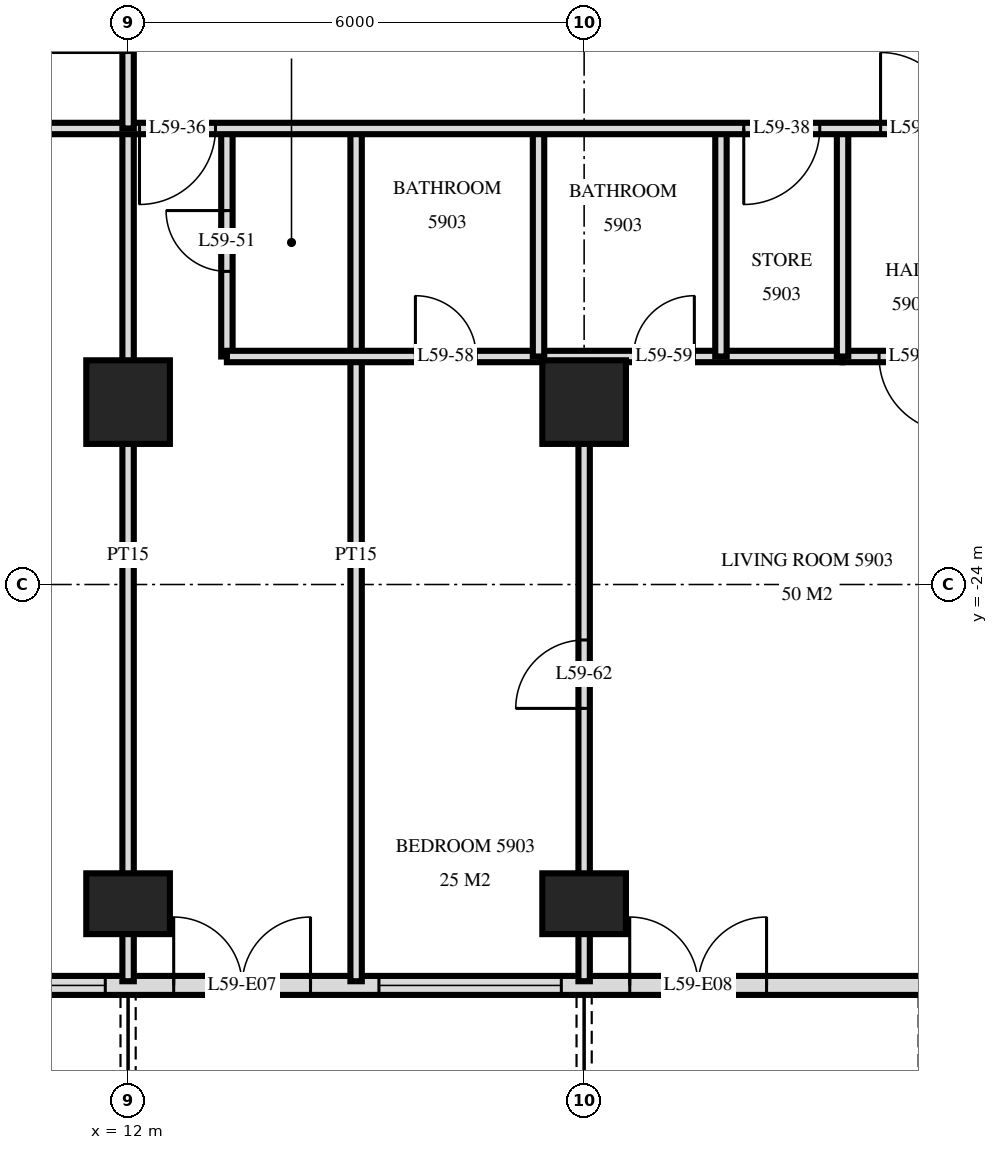
"""IFC4 building model, lengths in metres.
Left out: names, types, materials, properties, quantities, classifications, styles, units other than length and angle.
Written with IfcOpenShell. Run it as: python <this file> out.ifc"""

import sys

from ifc_helpers import new_model, si_unit, direction, frame, frame_2d, origin, origin_2d, place, context, subcontext, project, spatial, rectangle, extrude, element, fill, save


model = new_model("IFC4")
c1 = context("Model", 3, precision=1e-05, world=origin(), true_north=direction((0.0, 1.0)))
c2 = subcontext(c1, "Body", "Model", "MODEL_VIEW")
j1 = project(units=[si_unit("LENGTHUNIT", "METRE"), si_unit("PLANEANGLEUNIT", "RADIAN")], contexts=[c1])
p1 = place(None, origin())
s1 = spatial("IfcSite", under=j1, at=p1, CompositionType="ELEMENT")
p2 = place(p1, origin())
s2 = spatial("IfcBuilding", under=s1, at=p2, CompositionType="ELEMENT")
p3 = place(p2, frame((0.0, 0.0, 225.6)))
s3 = spatial("IfcBuildingStorey", under=s2, at=p3, CompositionType="ELEMENT", Elevation=225.6)
p4 = place(p3, frame((12.0, -28.2, 0.0), z_axis=(0.0, 0.0, 1.0), x_axis=(1.0, 0.0, 0.0)))
e1 = element("IfcColumn", 1, at=p4, inside=s3, PredefinedType="COLUMN", context=c2, shape_type="SweptSolid", body=[
    extrude(rectangle(XDim=1.1, YDim=0.8, at=origin_2d()), origin(), (0.0, 0.0, 1.0), 3.5),
])
p5 = place(p3, frame((12.0, -21.6, 0.0), z_axis=(0.0, 0.0, 1.0), x_axis=(1.0, 0.0, 0.0)))
e2 = element("IfcColumn", 2, at=p5, inside=s3, PredefinedType="COLUMN", context=c2, shape_type="SweptSolid", body=[
    extrude(rectangle(XDim=1.1, YDim=1.1, at=origin_2d()), origin(), (0.0, 0.0, 1.0), 3.5),
])
p6 = place(p3, frame((18.0, -28.2, 0.0), z_axis=(0.0, 0.0, 1.0), x_axis=(1.0, 0.0, 0.0)))
e3 = element("IfcColumn", 3, at=p6, inside=s3, PredefinedType="COLUMN", context=c2, shape_type="SweptSolid", body=[
    extrude(rectangle(XDim=1.1, YDim=0.8, at=origin_2d()), origin(), (0.0, 0.0, 1.0), 3.5),
])
p7 = place(p3, frame((18.0, -21.6, 0.0), z_axis=(0.0, 0.0, 1.0), x_axis=(1.0, 0.0, 0.0)))
e4 = element("IfcColumn", 4, at=p7, inside=s3, PredefinedType="COLUMN", context=c2, shape_type="SweptSolid", body=[
    extrude(rectangle(XDim=1.1, YDim=1.1, at=origin_2d()), origin(), (0.0, 0.0, 1.0), 3.5),
])
p8 = place(p3, frame((-22.475, -29.275, 0.0), z_axis=(0.0, 0.0, 1.0), x_axis=(1.0, 0.0, 0.0)))
e5 = element("IfcWall", 5, at=p8, inside=s3, PredefinedType="SOLIDWALL", context=c2, shape_type="SweptSolid", body=[
    extrude(rectangle(XDim=44.951, YDim=0.25, at=frame_2d((22.475, 0.0))), origin(), (0.0, 0.0, 1.0), 3.22),
])
p9 = place(p8, frame((0.575, 0.0, 0.0)))
e6 = element("IfcOpeningElement", 6, at=p9, cuts=e5, PredefinedType="OPENING", context=c2, shape_type="SweptSolid", body=[
    extrude(rectangle(XDim=1.8, YDim=2.4, at=frame_2d((0.9, 1.2))), frame((0.0, 0.135, 0.0), z_axis=(0.0, -1.0, 0.0), x_axis=(1.0, 0.0, 0.0)), (0.0, 0.0, 1.0), 0.27),
])
p10 = place(p8, frame((8.075, 0.0, 0.0)))
e7 = element("IfcOpeningElement", 7, at=p10, cuts=e5, PredefinedType="OPENING", context=c2, shape_type="SweptSolid", body=[
    extrude(rectangle(XDim=1.8, YDim=2.4, at=frame_2d((0.9, 1.2))), frame((0.0, 0.135, 0.0), z_axis=(0.0, -1.0, 0.0), x_axis=(1.0, 0.0, 0.0)), (0.0, 0.0, 1.0), 0.27),
])
p11 = place(p8, frame((11.075, 0.0, 0.0)))
e8 = element("IfcOpeningElement", 8, at=p11, cuts=e5, PredefinedType="OPENING", context=c2, shape_type="SweptSolid", body=[
    extrude(rectangle(XDim=1.8, YDim=2.4, at=frame_2d((0.9, 1.2))), frame((0.0, 0.135, 0.0), z_axis=(0.0, -1.0, 0.0), x_axis=(1.0, 0.0, 0.0)), (0.0, 0.0, 1.0), 0.27),
])
p12 = place(p8, frame((13.775, 0.0, 0.9)))
e9 = element("IfcOpeningElement", 9, at=p12, cuts=e5, PredefinedType="OPENING", context=c2, shape_type="SweptSolid", body=[
    extrude(rectangle(XDim=2.4, YDim=1.5, at=frame_2d((1.2, 0.75))), frame((0.0, 0.135, 0.0), z_axis=(0.0, -1.0, 0.0), x_axis=(1.0, 0.0, 0.0)), (0.0, 0.0, 1.0), 0.27),
])
p13 = place(p8, frame((16.775, 0.0, 0.9)))
e10 = element("IfcOpeningElement", 10, at=p13, cuts=e5, PredefinedType="OPENING", context=c2, shape_type="SweptSolid", body=[
    extrude(rectangle(XDim=2.4, YDim=1.5, at=frame_2d((1.2, 0.75))), frame((0.0, 0.135, 0.0), z_axis=(0.0, -1.0, 0.0), x_axis=(1.0, 0.0, 0.0)), (0.0, 0.0, 1.0), 0.27),
])
p14 = place(p8, frame((20.075, 0.0, 0.0)))
e11 = element("IfcOpeningElement", 11, at=p14, cuts=e5, PredefinedType="OPENING", context=c2, shape_type="SweptSolid", body=[
    extrude(rectangle(XDim=1.8, YDim=2.4, at=frame_2d((0.9, 1.2))), frame((0.0, 0.135, 0.0), z_axis=(0.0, -1.0, 0.0), x_axis=(1.0, 0.0, 0.0)), (0.0, 0.0, 1.0), 0.27),
])
p15 = place(p8, frame((23.075, 0.0, 0.0)))
e12 = element("IfcOpeningElement", 12, at=p15, cuts=e5, PredefinedType="OPENING", context=c2, shape_type="SweptSolid", body=[
    extrude(rectangle(XDim=1.8, YDim=2.4, at=frame_2d((0.9, 1.2))), frame((0.0, 0.135, 0.0), z_axis=(0.0, -1.0, 0.0), x_axis=(1.0, 0.0, 0.0)), (0.0, 0.0, 1.0), 0.27),
])
p16 = place(p8, frame((25.775, 0.0, 0.9)))
e13 = element("IfcOpeningElement", 13, at=p16, cuts=e5, PredefinedType="OPENING", context=c2, shape_type="SweptSolid", body=[
    extrude(rectangle(XDim=2.4, YDim=1.5, at=frame_2d((1.2, 0.75))), frame((0.0, 0.135, 0.0), z_axis=(0.0, -1.0, 0.0), x_axis=(1.0, 0.0, 0.0)), (0.0, 0.0, 1.0), 0.27),
])
p17 = place(p8, frame((29.075, 0.0, 0.0)))
e14 = element("IfcOpeningElement", 14, at=p17, cuts=e5, PredefinedType="OPENING", context=c2, shape_type="SweptSolid", body=[
    extrude(rectangle(XDim=1.8, YDim=2.4, at=frame_2d((0.9, 1.2))), frame((0.0, 0.135, 0.0), z_axis=(0.0, -1.0, 0.0), x_axis=(1.0, 0.0, 0.0)), (0.0, 0.0, 1.0), 0.27),
])
p18 = place(p8, frame((31.775, 0.0, 0.9)))
e15 = element("IfcOpeningElement", 15, at=p18, cuts=e5, PredefinedType="OPENING", context=c2, shape_type="SweptSolid", body=[
    extrude(rectangle(XDim=2.4, YDim=1.5, at=frame_2d((1.2, 0.75))), frame((0.0, 0.135, 0.0), z_axis=(0.0, -1.0, 0.0), x_axis=(1.0, 0.0, 0.0)), (0.0, 0.0, 1.0), 0.27),
])
p19 = place(p8, frame((35.075, 0.0, 0.0)))
e16 = element("IfcOpeningElement", 16, at=p19, cuts=e5, PredefinedType="OPENING", context=c2, shape_type="SweptSolid", body=[
    extrude(rectangle(XDim=1.8, YDim=2.4, at=frame_2d((0.9, 1.2))), frame((0.0, 0.135, 0.0), z_axis=(0.0, -1.0, 0.0), x_axis=(1.0, 0.0, 0.0)), (0.0, 0.0, 1.0), 0.27),
])
p20 = place(p8, frame((37.775, 0.0, 0.9)))
e17 = element("IfcOpeningElement", 17, at=p20, cuts=e5, PredefinedType="OPENING", context=c2, shape_type="SweptSolid", body=[
    extrude(rectangle(XDim=2.4, YDim=1.5, at=frame_2d((1.2, 0.75))), frame((0.0, 0.135, 0.0), z_axis=(0.0, -1.0, 0.0), x_axis=(1.0, 0.0, 0.0)), (0.0, 0.0, 1.0), 0.27),
])
p21 = place(p8, frame((41.075, 0.0, 0.0)))
e18 = element("IfcOpeningElement", 18, at=p21, cuts=e5, PredefinedType="OPENING", context=c2, shape_type="SweptSolid", body=[
    extrude(rectangle(XDim=1.8, YDim=2.4, at=frame_2d((0.9, 1.2))), frame((0.0, 0.135, 0.0), z_axis=(0.0, -1.0, 0.0), x_axis=(1.0, 0.0, 0.0)), (0.0, 0.0, 1.0), 0.27),
])
for number, where, z_axis, x_axis in (
    (19, (21.4, -21.0, 0.0), (0.0, 0.0, 1.0), (0.0, 1.0, 0.0)),
    (20, (19.8, -21.0, 0.0), (0.0, 0.0, 1.0), (0.0, 1.0, 0.0)),
):
    element("IfcWall", number, at=place(p3, frame(where, z_axis=z_axis, x_axis=x_axis)), inside=s3, PredefinedType="PARTITIONING", context=c2, shape_type="SweptSolid", body=[
        extrude(rectangle(XDim=3.0, YDim=0.15, at=frame_2d((1.5, 0.0))), origin(), (0.0, 0.0, 1.0), 3.22),
    ])
p22 = place(p3, frame((18.0, -29.22, 0.0), z_axis=(0.0, 0.0, 1.0), x_axis=(0.0, 1.0, 0.0)))
e21 = element("IfcWall", 21, at=p22, inside=s3, PredefinedType="PARTITIONING", context=c2, shape_type="SweptSolid", body=[
    extrude(rectangle(XDim=8.22, YDim=0.15, at=frame_2d((4.11, 0.0))), origin(), (0.0, 0.0, 1.0), 3.22),
])
p23 = place(p22, frame((3.59, 0.0, 0.0)))
e22 = element("IfcOpeningElement", 22, at=p23, cuts=e21, PredefinedType="OPENING", context=c2, shape_type="SweptSolid", body=[
    extrude(rectangle(XDim=0.9, YDim=2.1, at=frame_2d((0.45, 1.05))), frame((0.0, 0.085, 0.0), z_axis=(0.0, -1.0, 0.0), x_axis=(1.0, 0.0, 0.0)), (0.0, 0.0, 1.0), 0.17),
])
p24 = place(p3, frame((17.4, -21.0, 0.0), z_axis=(0.0, 0.0, 1.0), x_axis=(0.0, 1.0, 0.0)))
e23 = element("IfcWall", 23, at=p24, inside=s3, PredefinedType="PARTITIONING", context=c2, shape_type="SweptSolid", body=[
    extrude(rectangle(XDim=3.0, YDim=0.15, at=frame_2d((1.5, 0.0))), origin(), (0.0, 0.0, 1.0), 3.22),
])
p25 = place(p3, frame((15.0, -29.22, 0.0), z_axis=(0.0, 0.0, 1.0), x_axis=(0.0, 1.0, 0.0)))
e24 = element("IfcWall", 24, at=p25, inside=s3, PredefinedType="PARTITIONING", context=c2, shape_type="SweptSolid", body=[
    extrude(rectangle(XDim=11.22, YDim=0.15, at=frame_2d((5.61, 0.0))), origin(), (0.0, 0.0, 1.0), 3.22),
])
p26 = place(p3, frame((13.3, -21.0, 0.0), z_axis=(0.0, 0.0, 1.0), x_axis=(0.0, 1.0, 0.0)))
e25 = element("IfcWall", 25, at=p26, inside=s3, PredefinedType="PARTITIONING", context=c2, shape_type="SweptSolid", body=[
    extrude(rectangle(XDim=3.0, YDim=0.15, at=frame_2d((1.5, 0.0))), origin(), (0.0, 0.0, 1.0), 3.22),
])
p27 = place(p26, frame((1.12, 0.0, 0.0)))
e26 = element("IfcOpeningElement", 26, at=p27, cuts=e25, PredefinedType="OPENING", context=c2, shape_type="SweptSolid", body=[
    extrude(rectangle(XDim=0.8, YDim=2.1, at=frame_2d((0.4, 1.05))), frame((0.0, 0.085, 0.0), z_axis=(0.0, -1.0, 0.0), x_axis=(1.0, 0.0, 0.0)), (0.0, 0.0, 1.0), 0.17),
])
p28 = place(p3, frame((12.0, -18.0, 0.0), z_axis=(0.0, 0.0, 1.0), x_axis=(0.0, 1.0, 0.0)))
e27 = element("IfcWall", 27, at=p28, inside=s3, PredefinedType="PARTITIONING", context=c2, shape_type="SweptSolid", body=[
    extrude(rectangle(XDim=2.95, YDim=0.15, at=frame_2d((1.475, 0.0))), origin(), (0.0, 0.0, 1.0), 3.22),
])
p29 = place(p28, frame((1.0, 0.0, 0.0)))
e28 = element("IfcOpeningElement", 28, at=p29, cuts=e27, PredefinedType="OPENING", context=c2, shape_type="SweptSolid", body=[
    extrude(rectangle(XDim=1.0, YDim=2.1, at=frame_2d((0.5, 1.05))), frame((0.0, 0.085, 0.0), z_axis=(0.0, -1.0, 0.0), x_axis=(1.0, 0.0, 0.0)), (0.0, 0.0, 1.0), 0.17),
])
p30 = place(p3, frame((12.0, -29.22, 0.0), z_axis=(0.0, 0.0, 1.0), x_axis=(0.0, 1.0, 0.0)))
e29 = element("IfcWall", 29, at=p30, inside=s3, PredefinedType="PARTITIONING", context=c2, shape_type="SweptSolid", body=[
    extrude(rectangle(XDim=11.22, YDim=0.15, at=frame_2d((5.61, 0.0))), origin(), (0.0, 0.0, 1.0), 3.22),
])
p31 = place(p3, frame((21.4, -21.0, 0.0), z_axis=(0.0, 0.0, 1.0), x_axis=(1.0, 0.0, 0.0)))
e30 = element("IfcWall", 30, at=p31, inside=s3, PredefinedType="PARTITIONING", context=c2, shape_type="SweptSolid", body=[
    extrude(rectangle(XDim=2.0, YDim=0.15, at=frame_2d((1.0, 0.0))), origin(), (0.0, 0.0, 1.0), 3.22),
])
p32 = place(p31, frame((0.48, 0.0, 0.0)))
e31 = element("IfcOpeningElement", 31, at=p32, cuts=e30, PredefinedType="OPENING", context=c2, shape_type="SweptSolid", body=[
    extrude(rectangle(XDim=1.0, YDim=2.1, at=frame_2d((0.5, 1.05))), frame((0.0, 0.085, 0.0), z_axis=(0.0, -1.0, 0.0), x_axis=(1.0, 0.0, 0.0)), (0.0, 0.0, 1.0), 0.17),
])
p33 = place(p3, frame((13.3, -21.0, 0.0), z_axis=(0.0, 0.0, 1.0), x_axis=(1.0, 0.0, 0.0)))
e32 = element("IfcWall", 32, at=p33, inside=s3, PredefinedType="PARTITIONING", context=c2, shape_type="SweptSolid", body=[
    extrude(rectangle(XDim=8.1, YDim=0.15, at=frame_2d((4.05, 0.0))), origin(), (0.0, 0.0, 1.0), 3.22),
])
p34 = place(p33, frame((2.48, 0.0, 0.0)))
e33 = element("IfcOpeningElement", 33, at=p34, cuts=e32, PredefinedType="OPENING", context=c2, shape_type="SweptSolid", body=[
    extrude(rectangle(XDim=0.8, YDim=2.1, at=frame_2d((0.4, 1.05))), frame((0.0, 0.085, 0.0), z_axis=(0.0, -1.0, 0.0), x_axis=(1.0, 0.0, 0.0)), (0.0, 0.0, 1.0), 0.17),
])
p35 = place(p33, frame((5.35, 0.0, 0.0)))
e34 = element("IfcOpeningElement", 34, at=p35, cuts=e32, PredefinedType="OPENING", context=c2, shape_type="SweptSolid", body=[
    extrude(rectangle(XDim=0.8, YDim=2.1, at=frame_2d((0.4, 1.05))), frame((0.0, 0.085, 0.0), z_axis=(0.0, -1.0, 0.0), x_axis=(1.0, 0.0, 0.0)), (0.0, 0.0, 1.0), 0.17),
])
p36 = place(p3, frame((-26.82, -18.0, 0.0), z_axis=(0.0, 0.0, 1.0), x_axis=(1.0, 0.0, 0.0)))
e35 = element("IfcWall", 35, at=p36, inside=s3, PredefinedType="PARTITIONING", context=c2, shape_type="SweptSolid", body=[
    extrude(rectangle(XDim=53.64, YDim=0.15, at=frame_2d((26.82, 0.0))), origin(), (0.0, 0.0, 1.0), 3.22),
])
p37 = place(p36, frame((4.92, 0.0, 0.0)))
e36 = element("IfcOpeningElement", 36, at=p37, cuts=e35, PredefinedType="OPENING", context=c2, shape_type="SweptSolid", body=[
    extrude(rectangle(XDim=1.0, YDim=2.1, at=frame_2d((0.5, 1.05))), frame((0.0, 0.085, 0.0), z_axis=(0.0, -1.0, 0.0), x_axis=(1.0, 0.0, 0.0)), (0.0, 0.0, 1.0), 0.17),
])
p38 = place(p36, frame((1.62, 0.0, 0.0)))
e37 = element("IfcOpeningElement", 37, at=p38, cuts=e35, PredefinedType="OPENING", context=c2, shape_type="SweptSolid", body=[
    extrude(rectangle(XDim=1.0, YDim=2.1, at=frame_2d((0.5, 1.05))), frame((0.0, 0.085, 0.0), z_axis=(0.0, -1.0, 0.0), x_axis=(1.0, 0.0, 0.0)), (0.0, 0.0, 1.0), 0.17),
])
p39 = place(p36, frame((38.97, 0.0, 0.0)))
e38 = element("IfcOpeningElement", 38, at=p39, cuts=e35, PredefinedType="OPENING", context=c2, shape_type="SweptSolid", body=[
    extrude(rectangle(XDim=1.0, YDim=2.1, at=frame_2d((0.5, 1.05))), frame((0.0, 0.085, 0.0), z_axis=(0.0, -1.0, 0.0), x_axis=(1.0, 0.0, 0.0)), (0.0, 0.0, 1.0), 0.17),
])
p40 = place(p36, frame((48.72, 0.0, 0.0)))
e39 = element("IfcOpeningElement", 39, at=p40, cuts=e35, PredefinedType="OPENING", context=c2, shape_type="SweptSolid", body=[
    extrude(rectangle(XDim=1.0, YDim=2.1, at=frame_2d((0.5, 1.05))), frame((0.0, 0.085, 0.0), z_axis=(0.0, -1.0, 0.0), x_axis=(1.0, 0.0, 0.0)), (0.0, 0.0, 1.0), 0.17),
])
p41 = place(p36, frame((46.92, 0.0, 0.0)))
e40 = element("IfcOpeningElement", 40, at=p41, cuts=e35, PredefinedType="OPENING", context=c2, shape_type="SweptSolid", body=[
    extrude(rectangle(XDim=1.0, YDim=2.1, at=frame_2d((0.5, 1.05))), frame((0.0, 0.085, 0.0), z_axis=(0.0, -1.0, 0.0), x_axis=(1.0, 0.0, 0.0)), (0.0, 0.0, 1.0), 0.17),
])
p42 = place(p36, frame((18.82, 0.0, 0.0)))
e41 = element("IfcOpeningElement", 41, at=p42, cuts=e35, PredefinedType="OPENING", context=c2, shape_type="SweptSolid", body=[
    extrude(rectangle(XDim=1.0, YDim=2.1, at=frame_2d((0.5, 1.05))), frame((0.0, 0.085, 0.0), z_axis=(0.0, -1.0, 0.0), x_axis=(1.0, 0.0, 0.0)), (0.0, 0.0, 1.0), 0.17),
])
p43 = place(p36, frame((27.82, 0.0, 0.0)))
e42 = element("IfcOpeningElement", 42, at=p43, cuts=e35, PredefinedType="OPENING", context=c2, shape_type="SweptSolid", body=[
    extrude(rectangle(XDim=1.0, YDim=2.1, at=frame_2d((0.5, 1.05))), frame((0.0, 0.085, 0.0), z_axis=(0.0, -1.0, 0.0), x_axis=(1.0, 0.0, 0.0)), (0.0, 0.0, 1.0), 0.17),
])
p44 = place(p36, frame((35.32, 0.0, 0.0)))
e43 = element("IfcOpeningElement", 43, at=p44, cuts=e35, PredefinedType="OPENING", context=c2, shape_type="SweptSolid", body=[
    extrude(rectangle(XDim=1.0, YDim=2.1, at=frame_2d((0.5, 1.05))), frame((0.0, 0.085, 0.0), z_axis=(0.0, -1.0, 0.0), x_axis=(1.0, 0.0, 0.0)), (0.0, 0.0, 1.0), 0.17),
])
p45 = place(p18, origin())
e44 = element("IfcWindow", 44, at=p45, inside=s3, PartitioningType="SINGLE_PANEL", PredefinedType="WINDOW", context=c2, shape_type="SweptSolid", body=[
    extrude(rectangle(XDim=2.4, YDim=1.5, at=frame_2d((1.2, 0.75))), frame((0.0, 0.03, 0.0), z_axis=(0.0, -1.0, 0.0), x_axis=(1.0, 0.0, 0.0)), (0.0, 0.0, 1.0), 0.06),
])
fill(e15, e44)
p46 = place(p19, origin())
e45 = element("IfcDoor", 45, at=p46, inside=s3, OperationType="DOUBLE_DOOR_SINGLE_SWING", PredefinedType="DOOR", context=c2, shape_type="SweptSolid", body=[
    extrude(rectangle(XDim=1.8, YDim=2.4, at=frame_2d((0.9, 1.2))), frame((0.0, 0.025, 0.0), z_axis=(0.0, -1.0, 0.0), x_axis=(1.0, 0.0, 0.0)), (0.0, 0.0, 1.0), 0.05),
])
fill(e16, e45)
p47 = place(p20, origin())
e46 = element("IfcWindow", 46, at=p47, inside=s3, PartitioningType="SINGLE_PANEL", PredefinedType="WINDOW", context=c2, shape_type="SweptSolid", body=[
    extrude(rectangle(XDim=2.4, YDim=1.5, at=frame_2d((1.2, 0.75))), frame((0.0, 0.03, 0.0), z_axis=(0.0, -1.0, 0.0), x_axis=(1.0, 0.0, 0.0)), (0.0, 0.0, 1.0), 0.06),
])
fill(e17, e46)
p48 = place(p21, origin())
e47 = element("IfcDoor", 47, at=p48, inside=s3, OperationType="DOUBLE_DOOR_SINGLE_SWING", PredefinedType="DOOR", context=c2, shape_type="SweptSolid", body=[
    extrude(rectangle(XDim=1.8, YDim=2.4, at=frame_2d((0.9, 1.2))), frame((0.0, 0.025, 0.0), z_axis=(0.0, -1.0, 0.0), x_axis=(1.0, 0.0, 0.0)), (0.0, 0.0, 1.0), 0.05),
])
fill(e18, e47)
p49 = place(p39, frame((0.5, 0.0, 0.0), z_axis=(0.0, 0.0, 1.0), x_axis=(-1.0, 0.0, 0.0)))
e48 = element("IfcDoor", 48, at=p49, inside=s3, OperationType="SINGLE_SWING_LEFT", PredefinedType="DOOR", context=c2, shape_type="SweptSolid", body=[
    extrude(rectangle(XDim=1.0, YDim=2.1, at=frame_2d((0.0, 1.05))), frame((0.0, -0.025, 0.0), z_axis=(0.0, 1.0, 0.0), x_axis=(-1.0, 0.0, 0.0)), (0.0, 0.0, 1.0), 0.05),
])
fill(e38, e48)
p50 = place(p40, origin())
e49 = element("IfcDoor", 49, at=p50, inside=s3, OperationType="SINGLE_SWING_RIGHT", PredefinedType="DOOR", context=c2, shape_type="SweptSolid", body=[
    extrude(rectangle(XDim=1.0, YDim=2.1, at=frame_2d((0.5, 1.05))), frame((0.0, 0.025, 0.0), z_axis=(0.0, -1.0, 0.0), x_axis=(1.0, 0.0, 0.0)), (0.0, 0.0, 1.0), 0.05),
])
fill(e39, e49)
p51 = place(p41, frame((0.5, 0.0, 0.0), z_axis=(0.0, 0.0, 1.0), x_axis=(-1.0, 0.0, 0.0)))
e50 = element("IfcDoor", 50, at=p51, inside=s3, OperationType="SINGLE_SWING_LEFT", PredefinedType="DOOR", context=c2, shape_type="SweptSolid", body=[
    extrude(rectangle(XDim=1.0, YDim=2.1, at=frame_2d((0.0, 1.05))), frame((0.0, -0.025, 0.0), z_axis=(0.0, 1.0, 0.0), x_axis=(-1.0, 0.0, 0.0)), (0.0, 0.0, 1.0), 0.05),
])
fill(e40, e50)
p52 = place(p27, origin())
e51 = element("IfcDoor", 51, at=p52, inside=s3, OperationType="SINGLE_SWING_LEFT", PredefinedType="DOOR", context=c2, shape_type="SweptSolid", body=[
    extrude(rectangle(XDim=0.8, YDim=2.1, at=frame_2d((0.4, 1.05))), frame((0.0, 0.025, 0.0), z_axis=(0.0, -1.0, 0.0), x_axis=(1.0, 0.0, 0.0)), (0.0, 0.0, 1.0), 0.05),
])
fill(e26, e51)
p53 = place(p34, origin())
e52 = element("IfcDoor", 52, at=p53, inside=s3, OperationType="SINGLE_SWING_RIGHT", PredefinedType="DOOR", context=c2, shape_type="SweptSolid", body=[
    extrude(rectangle(XDim=0.8, YDim=2.1, at=frame_2d((0.4, 1.05))), frame((0.0, 0.025, 0.0), z_axis=(0.0, -1.0, 0.0), x_axis=(1.0, 0.0, 0.0)), (0.0, 0.0, 1.0), 0.05),
])
fill(e33, e52)
p54 = place(p35, origin())
e53 = element("IfcDoor", 53, at=p54, inside=s3, OperationType="SINGLE_SWING_LEFT", PredefinedType="DOOR", context=c2, shape_type="SweptSolid", body=[
    extrude(rectangle(XDim=0.8, YDim=2.1, at=frame_2d((0.4, 1.05))), frame((0.0, 0.025, 0.0), z_axis=(0.0, -1.0, 0.0), x_axis=(1.0, 0.0, 0.0)), (0.0, 0.0, 1.0), 0.05),
])
fill(e34, e53)
p55 = place(p32, frame((0.5, 0.0, 0.0), z_axis=(0.0, 0.0, 1.0), x_axis=(-1.0, 0.0, 0.0)))
e54 = element("IfcDoor", 54, at=p55, inside=s3, OperationType="SINGLE_SWING_RIGHT", PredefinedType="DOOR", context=c2, shape_type="SweptSolid", body=[
    extrude(rectangle(XDim=1.0, YDim=2.1, at=frame_2d((0.0, 1.05))), frame((0.0, -0.025, 0.0), z_axis=(0.0, 1.0, 0.0), x_axis=(-1.0, 0.0, 0.0)), (0.0, 0.0, 1.0), 0.05),
])
fill(e31, e54)
p56 = place(p23, origin())
e55 = element("IfcDoor", 55, at=p56, inside=s3, OperationType="SINGLE_SWING_RIGHT", PredefinedType="DOOR", context=c2, shape_type="SweptSolid", body=[
    extrude(rectangle(XDim=0.9, YDim=2.1, at=frame_2d((0.45, 1.05))), frame((0.0, 0.025, 0.0), z_axis=(0.0, -1.0, 0.0), x_axis=(1.0, 0.0, 0.0)), (0.0, 0.0, 1.0), 0.05),
])
fill(e22, e55)
save(model, sys.argv[1])
